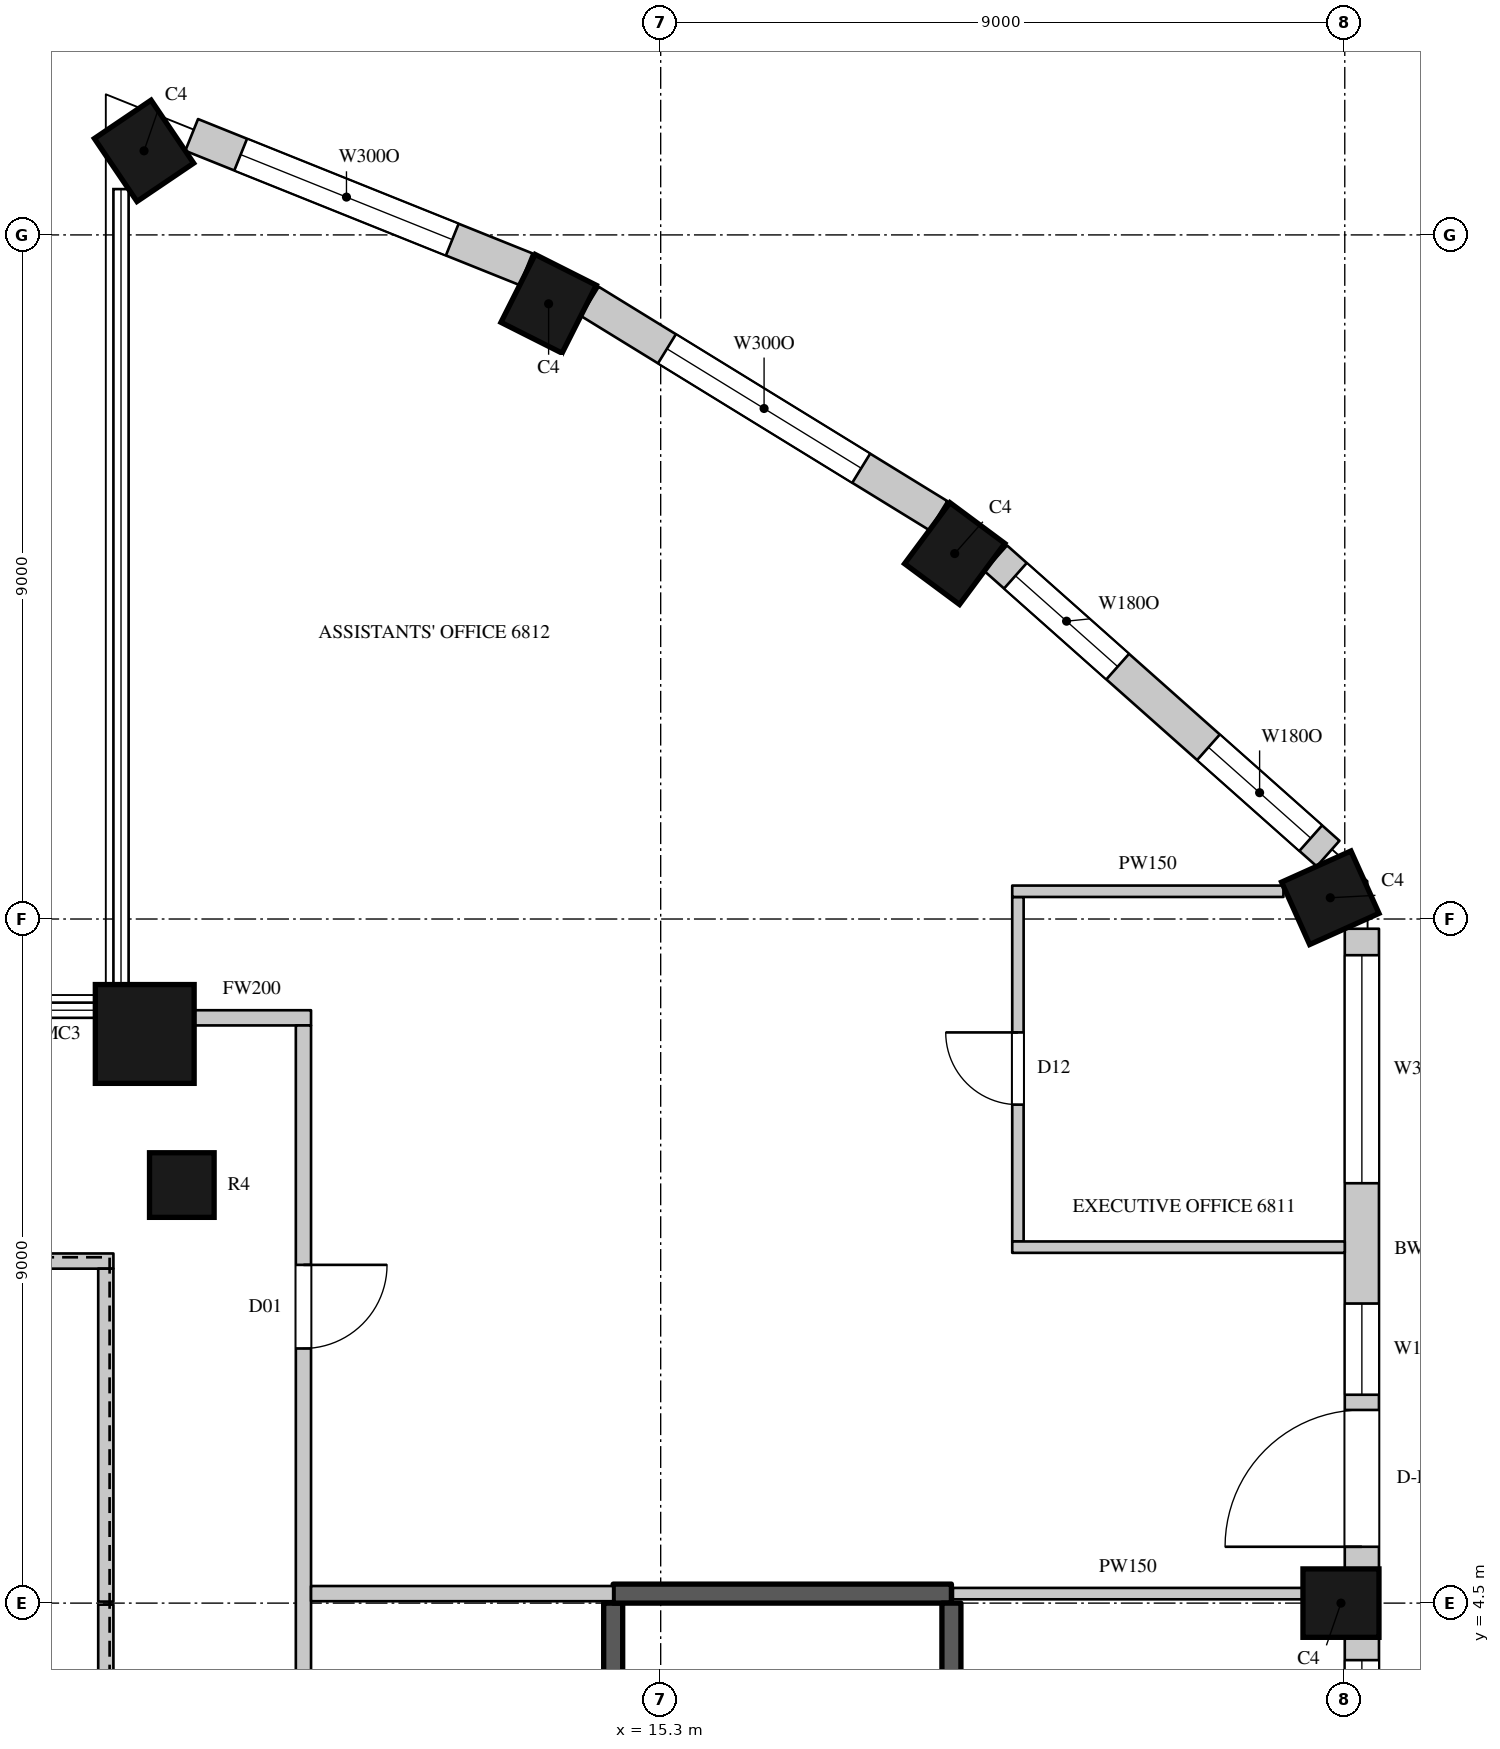
"""IFC4 building model, lengths in metres.
Left out: names, types, materials, properties, quantities, classifications, styles, units other than length and angle.
Written with IfcOpenShell. Run it as: python <this file> out.ifc"""

import sys

from ifc_helpers import new_model, si_unit, direction, frame, frame_2d, origin, origin_2d, place, context, subcontext, project, spatial, rectangle, circle, extrude, element, fill, save


model = new_model("IFC4")
c1 = context("Model", 3, precision=1e-05, world=origin(), true_north=direction((0.0, 1.0)))
c2 = subcontext(c1, "Body", "Model", "MODEL_VIEW")
j1 = project(units=[si_unit("LENGTHUNIT", "METRE"), si_unit("PLANEANGLEUNIT", "RADIAN")], contexts=[c1])
p1 = place(None, origin())
s1 = spatial("IfcSite", under=j1, at=p1, CompositionType="ELEMENT")
p2 = place(p1, origin())
s2 = spatial("IfcBuilding", under=s1, at=p2, CompositionType="ELEMENT")
p3 = place(p2, frame((0.0, 0.0, 300.8)))
s3 = spatial("IfcBuildingStorey", under=s2, at=p3, CompositionType="ELEMENT", Elevation=300.8)
p4 = place(p3, frame((8.503, 23.606, 0.0), z_axis=(0.0, 0.0, 1.0), x_axis=(-0.828469606019, -0.560034027451, 0.0)))
e1 = element("IfcColumn", 1, at=p4, inside=s3, PredefinedType="COLUMN", context=c2, shape_type="SweptSolid", body=[
    extrude(rectangle(XDim=0.9, YDim=1.0, at=origin_2d()), origin(), (0.0, 0.0, 1.0), 4.1),
])
p5 = place(p3, frame((8.512, 11.988, 0.0), z_axis=(0.0, 0.0, 1.0), x_axis=(1.0, 0.0, 0.0)))
e2 = element("IfcColumn", 2, at=p5, inside=s3, PredefinedType="COLUMN", context=c2, shape_type="SweptSolid", body=[
    extrude(circle(Radius=0.65, at=origin_2d()), origin(), (0.0, 0.0, 1.0), 4.1),
])
for number, where, z_axis, x_axis in (
    (3, (24.25, 4.5, 0.0), (0.0, 0.0, 1.0), (0.0, 1.0, 0.0)),
    (4, (24.11, 13.78, 0.0), (0.0, 0.0, 1.0), (-0.41, 0.912, 0.0)),
    (5, (19.168, 18.308, 0.0), (0.0, 0.0, 1.0), (-0.803, 0.596, 0.0)),
    (6, (13.826, 21.594, 0.0), (0.0, 0.0, 1.0), (-0.893, 0.45, 0.0)),
):
    element("IfcColumn", number, at=place(p3, frame(where, z_axis=z_axis, x_axis=x_axis)), inside=s3, PredefinedType="COLUMN", context=c2, shape_type="SweptSolid", body=[
        extrude(rectangle(XDim=0.9, YDim=1.0, at=origin_2d()), origin(), (0.0, 0.0, 1.0), 4.1),
    ])
p6 = place(p3, frame((9.0, 10.0, 0.0), z_axis=(0.0, 0.0, 1.0), x_axis=(1.0, 0.0, 0.0)))
e7 = element("IfcColumn", 7, at=p6, inside=s3, PredefinedType="COLUMN", context=c2, shape_type="SweptSolid", body=[
    extrude(circle(Radius=0.425, at=origin_2d()), origin(), (0.0, 0.0, 1.0), 4.1),
])
p7 = place(p3, frame((24.525, -4.05, 0.0), z_axis=(0.0, 0.0, 1.0), x_axis=(0.0, 1.0, 0.0)))
e8 = element("IfcWall", 8, at=p7, inside=s3, PredefinedType="SOLIDWALL", context=c2, shape_type="SweptSolid", body=[
    extrude(rectangle(XDim=8.1, YDim=0.45, at=frame_2d((4.05, 0.0))), origin(), (0.0, 0.0, 1.0), 3.8),
])
p8 = place(p7, frame((0.3, 0.0, 1.05)))
e9 = element("IfcOpeningElement", 9, at=p8, cuts=e8, PredefinedType="OPENING", context=c2, shape_type="SweptSolid", body=[
    extrude(rectangle(XDim=3.0, YDim=2.4, at=frame_2d((1.5, 1.2))), frame((0.0, 0.235, 0.0), z_axis=(0.0, -1.0, 0.0), x_axis=(1.0, 0.0, 0.0)), (0.0, 0.0, 1.0), 0.47),
])
p9 = place(p7, frame((4.8, 0.0, 1.05)))
e10 = element("IfcOpeningElement", 10, at=p9, cuts=e8, PredefinedType="OPENING", context=c2, shape_type="SweptSolid", body=[
    extrude(rectangle(XDim=3.0, YDim=2.4, at=frame_2d((1.5, 1.2))), frame((0.0, 0.235, 0.0), z_axis=(0.0, -1.0, 0.0), x_axis=(1.0, 0.0, 0.0)), (0.0, 0.0, 1.0), 0.47),
])
p10 = place(p3, frame((24.525, 4.95, 0.0), z_axis=(0.0, 0.0, 1.0), x_axis=(0.0, 1.0, 0.0)))
e11 = element("IfcWall", 11, at=p10, inside=s3, PredefinedType="SOLIDWALL", context=c2, shape_type="SweptSolid", body=[
    extrude(rectangle(XDim=8.422, YDim=0.45, at=frame_2d((4.211, 0.0))), origin(), (0.0, 0.0, 1.0), 3.8),
])
p11 = place(p10, frame((0.291, 0.0, 0.0)))
e12 = element("IfcOpeningElement", 12, at=p11, cuts=e11, PredefinedType="OPENING", context=c2, shape_type="SweptSolid", body=[
    extrude(rectangle(XDim=1.8, YDim=2.4, at=frame_2d((0.9, 1.2))), frame((0.0, 0.235, 0.0), z_axis=(0.0, -1.0, 0.0), x_axis=(1.0, 0.0, 0.0)), (0.0, 0.0, 1.0), 0.47),
])
p12 = place(p10, frame((2.291, 0.0, 1.05)))
e13 = element("IfcOpeningElement", 13, at=p12, cuts=e11, PredefinedType="OPENING", context=c2, shape_type="SweptSolid", body=[
    extrude(rectangle(XDim=1.2, YDim=2.4, at=frame_2d((0.6, 1.2))), frame((0.0, 0.235, 0.0), z_axis=(0.0, -1.0, 0.0), x_axis=(1.0, 0.0, 0.0)), (0.0, 0.0, 1.0), 0.47),
])
p13 = place(p10, frame((5.074, 0.0, 1.05)))
e14 = element("IfcOpeningElement", 14, at=p13, cuts=e11, PredefinedType="OPENING", context=c2, shape_type="SweptSolid", body=[
    extrude(rectangle(XDim=3.0, YDim=2.4, at=frame_2d((1.5, 1.2))), frame((0.0, 0.235, 0.0), z_axis=(0.0, -1.0, 0.0), x_axis=(1.0, 0.0, 0.0)), (0.0, 0.0, 1.0), 0.47),
])
p14 = place(p3, frame((24.081, 14.361, 0.0), z_axis=(0.0, 0.0, 1.0), x_axis=(-0.747570482973, 0.664182484704, 0.0)))
e15 = element("IfcWall", 15, at=p14, inside=s3, PredefinedType="SOLIDWALL", context=c2, shape_type="SweptSolid", body=[
    extrude(rectangle(XDim=5.85, YDim=0.45, at=frame_2d((2.925, 0.0))), origin(), (0.0, 0.0, 1.0), 3.8),
])
p15 = place(p14, frame((0.305, 0.0, 1.05)))
e16 = element("IfcOpeningElement", 16, at=p15, cuts=e15, PredefinedType="OPENING", context=c2, shape_type="SweptSolid", body=[
    extrude(rectangle(XDim=1.8, YDim=2.4, at=frame_2d((0.9, 1.2))), frame((0.0, 0.235, 0.0), z_axis=(0.0, -1.0, 0.0), x_axis=(1.0, 0.0, 0.0)), (0.0, 0.0, 1.0), 0.47),
])
p16 = place(p14, frame((3.703, 0.0, 1.05)))
e17 = element("IfcOpeningElement", 17, at=p16, cuts=e15, PredefinedType="OPENING", context=c2, shape_type="SweptSolid", body=[
    extrude(rectangle(XDim=1.8, YDim=2.4, at=frame_2d((0.9, 1.2))), frame((0.0, 0.235, 0.0), z_axis=(0.0, -1.0, 0.0), x_axis=(1.0, 0.0, 0.0)), (0.0, 0.0, 1.0), 0.47),
])
p17 = place(p3, frame((18.953, 18.806, 0.0), z_axis=(0.0, 0.0, 1.0), x_axis=(-0.851860664503, 0.523768468193, 0.0)))
e18 = element("IfcWall", 18, at=p17, inside=s3, PredefinedType="SOLIDWALL", context=c2, shape_type="SweptSolid", body=[
    extrude(rectangle(XDim=5.384, YDim=0.45, at=frame_2d((2.692, 0.0))), origin(), (0.0, 0.0, 1.0), 3.8),
])
p18 = place(p17, frame((1.192, 0.0, 1.05)))
e19 = element("IfcOpeningElement", 19, at=p18, cuts=e18, PredefinedType="OPENING", context=c2, shape_type="SweptSolid", body=[
    extrude(rectangle(XDim=3.0, YDim=2.4, at=frame_2d((1.5, 1.2))), frame((0.0, 0.235, 0.0), z_axis=(0.0, -1.0, 0.0), x_axis=(1.0, 0.0, 0.0)), (0.0, 0.0, 1.0), 0.47),
])
p19 = place(p3, frame((13.529, 22.048, 0.0), z_axis=(0.0, 0.0, 1.0), x_axis=(-0.927957332619, 0.372686448424, 0.0)))
e20 = element("IfcWall", 20, at=p19, inside=s3, PredefinedType="SOLIDWALL", context=c2, shape_type="SweptSolid", body=[
    extrude(rectangle(XDim=4.741, YDim=0.45, at=frame_2d((2.371, 0.0))), origin(), (0.0, 0.0, 1.0), 3.8),
])
p20 = place(p19, frame((1.047, 0.0, 1.05)))
e21 = element("IfcOpeningElement", 21, at=p20, cuts=e20, PredefinedType="OPENING", context=c2, shape_type="SweptSolid", body=[
    extrude(rectangle(XDim=3.0, YDim=2.4, at=frame_2d((1.5, 1.2))), frame((0.0, 0.235, 0.0), z_axis=(0.0, -1.0, 0.0), x_axis=(1.0, 0.0, 0.0)), (0.0, 0.0, 1.0), 0.47),
])
p21 = place(p3, frame((-6.1, 9.0, 0.0), z_axis=(0.0, 0.0, 1.0), x_axis=(1.0, 0.0, 0.0)))
e22 = element("IfcWall", 22, at=p21, inside=s3, PredefinedType="PARTITIONING", context=c2, shape_type="SweptSolid", body=[
    extrude(rectangle(XDim=14.2, YDim=0.2, at=frame_2d((7.1, 0.0))), origin(), (0.0, 0.0, 1.0), 3.8),
])
p22 = place(p3, frame((8.0, -8.9, 0.0), z_axis=(0.0, 0.0, 1.0), x_axis=(0.0, 1.0, 0.0)))
e23 = element("IfcWall", 23, at=p22, inside=s3, PredefinedType="PARTITIONING", context=c2, shape_type="SweptSolid", body=[
    extrude(rectangle(XDim=13.38, YDim=0.2, at=frame_2d((6.69, 0.0))), origin(), (0.0, 0.0, 1.0), 3.8),
])
p23 = place(p3, frame((8.0, 4.52, 0.0), z_axis=(0.0, 0.0, 1.0), x_axis=(0.0, 1.0, 0.0)))
e24 = element("IfcWall", 24, at=p23, inside=s3, PredefinedType="PARTITIONING", context=c2, shape_type="SweptSolid", body=[
    extrude(rectangle(XDim=4.38, YDim=0.2, at=frame_2d((2.19, 0.0))), origin(), (0.0, 0.0, 1.0), 3.8),
])
p24 = place(p3, frame((9.144, 12.2, 0.0), z_axis=(0.0, 0.0, 1.0), x_axis=(1.0, 0.0, 0.0)))
e25 = element("IfcWall", 25, at=p24, inside=s3, PredefinedType="PARTITIONING", context=c2, shape_type="SweptSolid", body=[
    extrude(rectangle(XDim=1.556, YDim=0.2, at=frame_2d((0.778, 0.0))), origin(), (0.0, 0.0, 1.0), 3.8),
])
p25 = place(p3, frame((10.6, -11.6, 0.0), z_axis=(0.0, 0.0, 1.0), x_axis=(0.0, 1.0, 0.0)))
e26 = element("IfcWall", 26, at=p25, inside=s3, PredefinedType="PARTITIONING", context=c2, shape_type="SweptSolid", body=[
    extrude(rectangle(XDim=23.7, YDim=0.2, at=frame_2d((11.85, 0.0))), origin(), (0.0, 0.0, 1.0), 3.8),
])
p26 = place(p25, frame((9.45, 0.0, 0.0)))
e27 = element("IfcOpeningElement", 27, at=p26, cuts=e26, PredefinedType="OPENING", context=c2, shape_type="SweptSolid", body=[
    extrude(rectangle(XDim=1.5, YDim=2.4, at=frame_2d((0.75, 1.2))), frame((0.0, 0.11, 0.0), z_axis=(0.0, -1.0, 0.0), x_axis=(1.0, 0.0, 0.0)), (0.0, 0.0, 1.0), 0.22),
])
p27 = place(p25, frame((19.45, 0.0, 0.0)))
e28 = element("IfcOpeningElement", 28, at=p27, cuts=e26, PredefinedType="OPENING", context=c2, shape_type="SweptSolid", body=[
    extrude(rectangle(XDim=1.1, YDim=2.4, at=frame_2d((0.55, 1.2))), frame((0.0, 0.11, 0.0), z_axis=(0.0, -1.0, 0.0), x_axis=(1.0, 0.0, 0.0)), (0.0, 0.0, 1.0), 0.22),
])
p28 = place(p25, frame((4.6, 0.0, 0.0)))
e29 = element("IfcOpeningElement", 29, at=p28, cuts=e26, PredefinedType="OPENING", context=c2, shape_type="SweptSolid", body=[
    extrude(rectangle(XDim=1.1, YDim=2.4, at=frame_2d((0.55, 1.2))), frame((0.0, 0.11, 0.0), z_axis=(0.0, -1.0, 0.0), x_axis=(1.0, 0.0, 0.0)), (0.0, 0.0, 1.0), 0.22),
])
p29 = place(p3, frame((10.7, 4.625, 0.0), z_axis=(0.0, 0.0, 1.0), x_axis=(1.0, 0.0, 0.0)))
e30 = element("IfcWall", 30, at=p29, inside=s3, PredefinedType="PARTITIONING", context=c2, shape_type="SweptSolid", body=[
    extrude(rectangle(XDim=3.975, YDim=0.2, at=frame_2d((1.988, 0.0))), origin(), (0.0, 0.0, 1.0), 3.8),
])
p30 = place(p3, frame((19.145, 4.625, 0.0), z_axis=(0.0, 0.0, 1.0), x_axis=(1.0, 0.0, 0.0)))
e31 = element("IfcWall", 31, at=p30, inside=s3, PredefinedType="PARTITIONING", context=c2, shape_type="SweptSolid", body=[
    extrude(rectangle(XDim=4.605, YDim=0.15, at=frame_2d((2.302, 0.0))), origin(), (0.0, 0.0, 1.0), 3.8),
])
p31 = place(p3, frame((20.0, 9.258, 0.0), z_axis=(0.0, 0.0, 1.0), x_axis=(0.0, 1.0, 0.0)))
e32 = element("IfcWall", 32, at=p31, inside=s3, PredefinedType="PARTITIONING", context=c2, shape_type="SweptSolid", body=[
    extrude(rectangle(XDim=4.532, YDim=0.15, at=frame_2d((2.266, 0.0))), origin(), (0.0, 0.0, 1.0), 3.8),
])
p32 = place(p31, frame((1.8, 0.0, 0.0)))
e33 = element("IfcOpeningElement", 33, at=p32, cuts=e32, PredefinedType="OPENING", context=c2, shape_type="SweptSolid", body=[
    extrude(rectangle(XDim=0.95, YDim=2.2, at=frame_2d((0.475, 1.1))), frame((0.0, 0.085, 0.0), z_axis=(0.0, -1.0, 0.0), x_axis=(1.0, 0.0, 0.0)), (0.0, 0.0, 1.0), 0.17),
])
p33 = place(p3, frame((19.925, 9.183, 0.0), z_axis=(0.0, 0.0, 1.0), x_axis=(1.0, 0.0, 0.0)))
e34 = element("IfcWall", 34, at=p33, inside=s3, PredefinedType="PARTITIONING", context=c2, shape_type="SweptSolid", body=[
    extrude(rectangle(XDim=4.375, YDim=0.15, at=frame_2d((2.188, 0.0))), origin(), (0.0, 0.0, 1.0), 3.15),
])
p34 = place(p3, frame((19.925, 13.865, 0.0), z_axis=(0.0, 0.0, 1.0), x_axis=(1.0, 0.0, 0.0)))
e35 = element("IfcWall", 35, at=p34, inside=s3, PredefinedType="PARTITIONING", context=c2, shape_type="SweptSolid", body=[
    extrude(rectangle(XDim=3.568, YDim=0.15, at=frame_2d((1.784, 0.0))), origin(), (0.0, 0.0, 1.0), 3.8),
])
p35 = place(p3, frame((14.675, -4.5, 0.0), z_axis=(0.0, 0.0, 1.0), x_axis=(0.0, 1.0, 0.0)))
e36 = element("IfcWall", 36, at=p35, inside=s3, PredefinedType="SHEAR", context=c2, shape_type="SweptSolid", body=[
    extrude(rectangle(XDim=9.0, YDim=0.25, at=frame_2d((4.5, 0.0))), origin(), (0.0, 0.0, 1.0), 3.8),
])
p36 = place(p35, frame((0.45, 0.0, 0.0)))
e37 = element("IfcOpeningElement", 37, at=p36, cuts=e36, PredefinedType="OPENING", context=c2, shape_type="SweptSolid", body=[
    extrude(rectangle(XDim=1.1, YDim=2.2, at=frame_2d((0.55, 1.1))), frame((0.0, 0.135, 0.0), z_axis=(0.0, -1.0, 0.0), x_axis=(1.0, 0.0, 0.0)), (0.0, 0.0, 1.0), 0.27),
])
p37 = place(p3, frame((14.675, 4.625, 0.0), z_axis=(0.0, 0.0, 1.0), x_axis=(1.0, 0.0, 0.0)))
e38 = element("IfcWall", 38, at=p37, inside=s3, PredefinedType="SHEAR", context=c2, shape_type="SweptSolid", body=[
    extrude(rectangle(XDim=4.45, YDim=0.25, at=frame_2d((2.225, 0.0))), origin(), (0.0, 0.0, 1.0), 3.8),
])
p38 = place(p3, frame((19.125, -4.5, 0.0), z_axis=(0.0, 0.0, 1.0), x_axis=(0.0, 1.0, 0.0)))
e39 = element("IfcWall", 39, at=p38, inside=s3, PredefinedType="SHEAR", context=c2, shape_type="SweptSolid", body=[
    extrude(rectangle(XDim=9.0, YDim=0.25, at=frame_2d((4.5, 0.0))), origin(), (0.0, 0.0, 1.0), 3.8),
])
p39 = place(p9, origin())
e40 = element("IfcWindow", 40, at=p39, inside=s3, PartitioningType="SINGLE_PANEL", PredefinedType="WINDOW", context=c2, shape_type="SweptSolid", body=[
    extrude(rectangle(XDim=3.0, YDim=2.4, at=frame_2d((1.5, 1.2))), frame((0.0, 0.135, 0.0), z_axis=(0.0, -1.0, 0.0), x_axis=(1.0, 0.0, 0.0)), (0.0, 0.0, 1.0), 0.06),
])
fill(e10, e40)
p40 = place(p11, origin())
e41 = element("IfcDoor", 41, at=p40, inside=s3, OperationType="SLIDING_TO_LEFT", PredefinedType="DOOR", context=c2, shape_type="SweptSolid", body=[
    extrude(rectangle(XDim=1.8, YDim=2.4, at=frame_2d((0.9, 1.2))), frame((0.0, 0.13, 0.0), z_axis=(0.0, -1.0, 0.0), x_axis=(1.0, 0.0, 0.0)), (0.0, 0.0, 1.0), 0.05),
])
fill(e12, e41)
p41 = place(p12, origin())
e42 = element("IfcWindow", 42, at=p41, inside=s3, PartitioningType="SINGLE_PANEL", PredefinedType="WINDOW", context=c2, shape_type="SweptSolid", body=[
    extrude(rectangle(XDim=1.2, YDim=2.4, at=frame_2d((0.6, 1.2))), frame((0.0, 0.135, 0.0), z_axis=(0.0, -1.0, 0.0), x_axis=(1.0, 0.0, 0.0)), (0.0, 0.0, 1.0), 0.06),
])
fill(e13, e42)
p42 = place(p13, origin())
e43 = element("IfcWindow", 43, at=p42, inside=s3, PartitioningType="SINGLE_PANEL", PredefinedType="WINDOW", context=c2, shape_type="SweptSolid", body=[
    extrude(rectangle(XDim=3.0, YDim=2.4, at=frame_2d((1.5, 1.2))), frame((0.0, 0.135, 0.0), z_axis=(0.0, -1.0, 0.0), x_axis=(1.0, 0.0, 0.0)), (0.0, 0.0, 1.0), 0.06),
])
fill(e14, e43)
p43 = place(p15, origin())
e44 = element("IfcWindow", 44, at=p43, inside=s3, PartitioningType="SINGLE_PANEL", PredefinedType="WINDOW", context=c2, shape_type="SweptSolid", body=[
    extrude(rectangle(XDim=1.8, YDim=2.4, at=frame_2d((0.9, 1.2))), frame((0.0, 0.135, 0.0), z_axis=(0.0, -1.0, 0.0), x_axis=(1.0, 0.0, 0.0)), (0.0, 0.0, 1.0), 0.06),
])
fill(e16, e44)
p44 = place(p16, origin())
e45 = element("IfcWindow", 45, at=p44, inside=s3, PartitioningType="SINGLE_PANEL", PredefinedType="WINDOW", context=c2, shape_type="SweptSolid", body=[
    extrude(rectangle(XDim=1.8, YDim=2.4, at=frame_2d((0.9, 1.2))), frame((0.0, 0.135, 0.0), z_axis=(0.0, -1.0, 0.0), x_axis=(1.0, 0.0, 0.0)), (0.0, 0.0, 1.0), 0.06),
])
fill(e17, e45)
p45 = place(p18, origin())
e46 = element("IfcWindow", 46, at=p45, inside=s3, PartitioningType="SINGLE_PANEL", PredefinedType="WINDOW", context=c2, shape_type="SweptSolid", body=[
    extrude(rectangle(XDim=3.0, YDim=2.4, at=frame_2d((1.5, 1.2))), frame((0.0, 0.135, 0.0), z_axis=(0.0, -1.0, 0.0), x_axis=(1.0, 0.0, 0.0)), (0.0, 0.0, 1.0), 0.06),
])
fill(e19, e46)
p46 = place(p20, origin())
e47 = element("IfcWindow", 47, at=p46, inside=s3, PartitioningType="SINGLE_PANEL", PredefinedType="WINDOW", context=c2, shape_type="SweptSolid", body=[
    extrude(rectangle(XDim=3.0, YDim=2.4, at=frame_2d((1.5, 1.2))), frame((0.0, 0.135, 0.0), z_axis=(0.0, -1.0, 0.0), x_axis=(1.0, 0.0, 0.0)), (0.0, 0.0, 1.0), 0.06),
])
fill(e21, e47)
p47 = place(p27, origin())
e48 = element("IfcDoor", 48, at=p47, inside=s3, OperationType="SINGLE_SWING_LEFT", PredefinedType="DOOR", context=c2, shape_type="SweptSolid", body=[
    extrude(rectangle(XDim=1.1, YDim=2.4, at=frame_2d((0.55, 1.2))), frame((0.0, 0.025, 0.0), z_axis=(0.0, -1.0, 0.0), x_axis=(1.0, 0.0, 0.0)), (0.0, 0.0, 1.0), 0.05),
])
fill(e28, e48)
p48 = place(p32, origin())
e49 = element("IfcDoor", 49, at=p48, inside=s3, OperationType="SINGLE_SWING_RIGHT", PredefinedType="DOOR", context=c2, shape_type="SweptSolid", body=[
    extrude(rectangle(XDim=0.95, YDim=2.2, at=frame_2d((0.475, 1.1))), frame((0.0, 0.025, 0.0), z_axis=(0.0, -1.0, 0.0), x_axis=(1.0, 0.0, 0.0)), (0.0, 0.0, 1.0), 0.05),
])
fill(e33, e49)
save(model, sys.argv[1])
